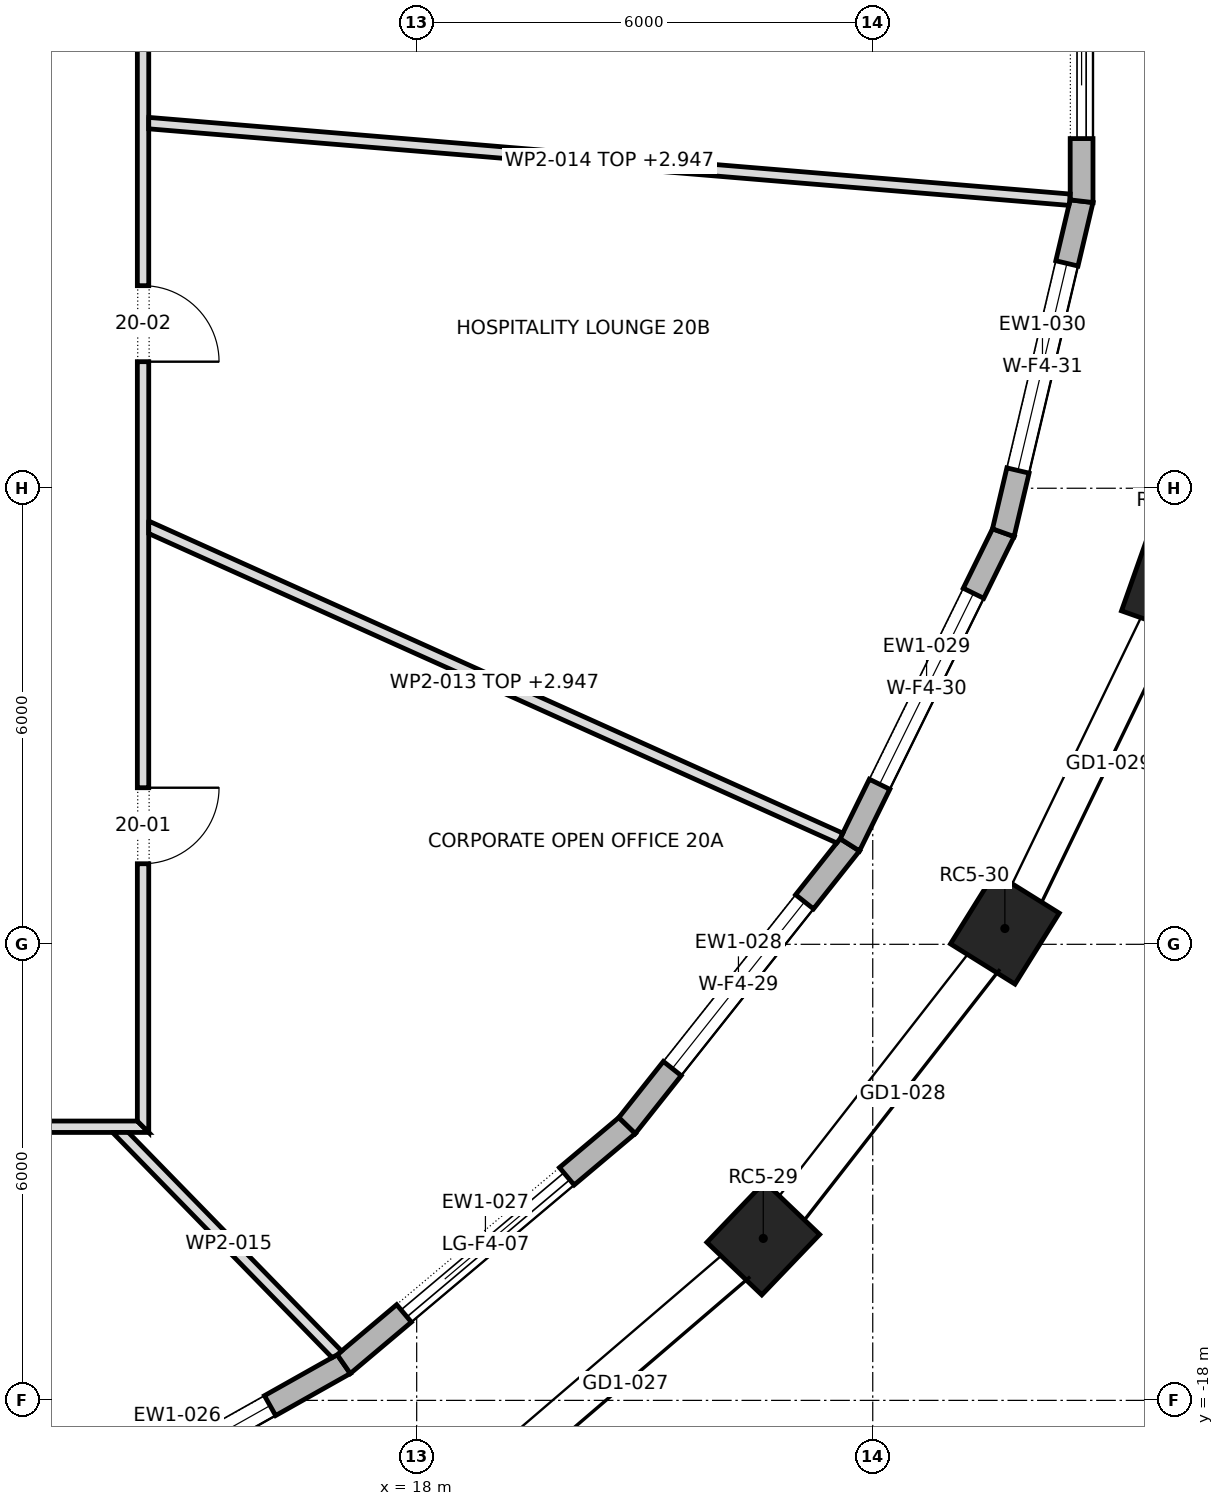
"""IFC4 building model, lengths in metres.
Left out: names, types, materials, properties, quantities, classifications, styles, units other than length and angle.
Written with IfcOpenShell. Run it as: python <this file> out.ifc"""

import sys

from ifc_helpers import new_model, si_unit, direction, frame, frame_2d, origin, origin_2d, place, context, subcontext, project, spatial, polyline, rectangle, outline, extrude, element, fill, save


model = new_model("IFC4")
c1 = context("Model", 3, precision=1e-05, world=origin(), true_north=direction((0.0, 1.0)))
c2 = subcontext(c1, "Body", "Model", "MODEL_VIEW")
j1 = project(units=[si_unit("LENGTHUNIT", "METRE"), si_unit("PLANEANGLEUNIT", "RADIAN")], contexts=[c1])
p1 = place(None, origin())
s1 = spatial("IfcSite", under=j1, at=p1, CompositionType="ELEMENT")
p2 = place(p1, origin())
s2 = spatial("IfcBuilding", under=s1, at=p2, CompositionType="ELEMENT")
p3 = place(p2, frame((0.0, 0.0, 288.3)))
s3 = spatial("IfcBuildingStorey", under=s2, at=p3, CompositionType="ELEMENT", Elevation=288.3)
for number, where, z_axis, x_axis in (
    (1, (22.56, -15.869, 0.0), (0.0, 0.0, 1.0), (0.692, 0.722, 0.0)),
    (2, (25.738, -11.792, 0.0), (0.0, 0.0, 1.0), (0.529, 0.849, 0.0)),
    (3, (27.927, -7.261, 0.0), (0.0, 0.0, 1.0), (0.334, 0.943, 0.0)),
):
    element("IfcColumn", number, at=place(p3, frame(where, z_axis=z_axis, x_axis=x_axis)), inside=s3, PredefinedType="COLUMN", context=c2, shape_type="SweptSolid", body=[
        extrude(rectangle(XDim=1.1, YDim=1.0, at=origin_2d()), origin(), (0.0, 0.0, 1.0), 4.0),
    ])
p4 = place(p3, frame((12.661, -19.988, 0.0), z_axis=(0.0, 0.0, 1.0), x_axis=(0.871488606878, 0.490415750239, 0.0)))
e4 = element("IfcWall", 4, at=p4, inside=s3, PredefinedType="STANDARD", context=c2, shape_type="SweptSolid", body=[
    extrude(outline(polyline([(-0.013, -0.15), (5.04, -0.15), (5.012, 0.15), (0.013, 0.15), (-0.013, -0.15)])), origin(), (0.0, 0.0, 1.0), 3.7),
])
p5 = place(p4, frame((1.113, 0.0, 0.6)))
e5 = element("IfcOpeningElement", 5, at=p5, cuts=e4, PredefinedType="OPENING", context=c2, shape_type="SweptSolid", body=[
    extrude(rectangle(XDim=2.8, YDim=2.65, at=frame_2d((1.4, 1.325))), frame((0.0, 0.162, 0.0), z_axis=(0.0, -1.0, 0.0), x_axis=(1.0, 0.0, 0.0)), (0.0, 0.0, 1.0), 0.324),
])
p6 = place(p3, frame((17.041, -17.523, 0.0), z_axis=(0.0, 0.0, 1.0), x_axis=(0.764876116592, 0.644177402792, 0.0)))
e6 = element("IfcWall", 6, at=p6, inside=s3, PredefinedType="STANDARD", context=c2, shape_type="SweptSolid", body=[
    extrude(outline(polyline([(-0.014, -0.15), (4.888, -0.15), (4.858, 0.15), (0.014, 0.15), (-0.014, -0.15)])), origin(), (0.0, 0.0, 1.0), 3.7),
])
p7 = place(p6, frame((1.036, 0.0, 0.0)))
e7 = element("IfcOpeningElement", 7, at=p7, cuts=e6, PredefinedType="OPENING", context=c2, shape_type="SweptSolid", body=[
    extrude(rectangle(XDim=2.8, YDim=3.25, at=frame_2d((1.4, 1.625))), frame((0.0, 0.162, 0.0), z_axis=(0.0, -1.0, 0.0), x_axis=(1.0, 0.0, 0.0)), (0.0, 0.0, 1.0), 0.324),
])
p8 = place(p3, frame((20.768, -14.384, 0.0), z_axis=(0.0, 0.0, 1.0), x_axis=(0.621544881236, 0.783378555112, 0.0)))
e8 = element("IfcWall", 8, at=p8, inside=s3, PredefinedType="STANDARD", context=c2, shape_type="SweptSolid", body=[
    extrude(outline(polyline([(-0.015, -0.15), (4.73, -0.15), (4.698, 0.15), (0.015, 0.15), (-0.015, -0.15)])), origin(), (0.0, 0.0, 1.0), 3.7),
])
p9 = place(p8, frame((0.957, 0.0, 0.6)))
e9 = element("IfcOpeningElement", 9, at=p9, cuts=e8, PredefinedType="OPENING", context=c2, shape_type="SweptSolid", body=[
    extrude(rectangle(XDim=2.8, YDim=2.65, at=frame_2d((1.4, 1.325))), frame((0.0, 0.162, 0.0), z_axis=(0.0, -1.0, 0.0), x_axis=(1.0, 0.0, 0.0)), (0.0, 0.0, 1.0), 0.324),
])
p10 = place(p3, frame((23.698, -10.691, 0.0), z_axis=(0.0, 0.0, 1.0), x_axis=(0.441335149795, 0.897342345794, 0.0)))
e10 = element("IfcWall", 10, at=p10, inside=s3, PredefinedType="STANDARD", context=c2, shape_type="SweptSolid", body=[
    extrude(outline(polyline([(-0.016, -0.15), (4.593, -0.15), (4.559, 0.15), (0.016, 0.15), (-0.016, -0.15)])), origin(), (0.0, 0.0, 1.0), 3.7),
])
p11 = place(p10, frame((0.888, 0.0, 0.6)))
e11 = element("IfcOpeningElement", 11, at=p11, cuts=e10, PredefinedType="OPENING", context=c2, shape_type="SweptSolid", body=[
    extrude(rectangle(XDim=2.8, YDim=2.65, at=frame_2d((1.4, 1.325))), frame((0.0, 0.162, 0.0), z_axis=(0.0, -1.0, 0.0), x_axis=(1.0, 0.0, 0.0)), (0.0, 0.0, 1.0), 0.324),
])
p12 = place(p3, frame((25.718, -6.585, 0.0), z_axis=(0.0, 0.0, 1.0), x_axis=(0.229862207503, 0.973223183839, 0.0)))
e12 = element("IfcWall", 12, at=p12, inside=s3, PredefinedType="STANDARD", context=c2, shape_type="SweptSolid", body=[
    extrude(outline(polyline([(-0.017, -0.15), (4.499, -0.15), (4.463, 0.15), (0.017, 0.15), (-0.017, -0.15)])), origin(), (0.0, 0.0, 1.0), 3.7),
])
p13 = place(p12, frame((0.841, 0.0, 0.6)))
e13 = element("IfcOpeningElement", 13, at=p13, cuts=e12, PredefinedType="OPENING", context=c2, shape_type="SweptSolid", body=[
    extrude(rectangle(XDim=2.8, YDim=2.65, at=frame_2d((1.4, 1.325))), frame((0.0, 0.162, 0.0), z_axis=(0.0, -1.0, 0.0), x_axis=(1.0, 0.0, 0.0)), (0.0, 0.0, 1.0), 0.324),
])
p14 = place(p3, frame((26.748, -2.224, 0.0), z_axis=(0.0, 0.0, 1.0), x_axis=(0.0, 1.0, 0.0)))
e14 = element("IfcWall", 14, at=p14, inside=s3, PredefinedType="STANDARD", context=c2, shape_type="SweptSolid", body=[
    extrude(outline(polyline([(-0.018, -0.15), (4.465, -0.15), (4.43, 0.15), (0.018, 0.15), (-0.018, -0.15)])), origin(), (0.0, 0.0, 1.0), 3.7),
])
p15 = place(p14, frame((0.824, 0.0, 0.0)))
e15 = element("IfcOpeningElement", 15, at=p15, cuts=e14, PredefinedType="OPENING", context=c2, shape_type="SweptSolid", body=[
    extrude(rectangle(XDim=2.8, YDim=3.25, at=frame_2d((1.4, 1.625))), frame((0.0, 0.162, 0.0), z_axis=(0.0, -1.0, 0.0), x_axis=(1.0, 0.0, 0.0)), (0.0, 0.0, 1.0), 0.324),
])
p16 = place(p3, frame((-14.475, -14.4, 0.0), z_axis=(0.0, 0.0, 1.0), x_axis=(1.0, 0.0, 0.0)))
e16 = element("IfcWall", 16, at=p16, inside=s3, PredefinedType="PARTITIONING", context=c2, shape_type="SweptSolid", body=[
    extrude(outline(polyline([(0.0, -0.075), (1.93, -0.075), (3.86, -0.075), (5.79, -0.075), (7.72, -0.075), (9.65, -0.075), (11.58, -0.075), (13.51, -0.075), (15.44, -0.075), (17.37, -0.075), (19.3, -0.075), (21.23, -0.075), (23.16, -0.075), (25.09, -0.075), (27.02, -0.075), (28.95, -0.075), (28.8, 0.075), (26.89, 0.075), (24.98, 0.075), (23.07, 0.075), (21.16, 0.075), (19.25, 0.075), (17.34, 0.075), (15.43, 0.075), (13.52, 0.075), (11.61, 0.075), (9.7, 0.075), (7.79, 0.075), (5.88, 0.075), (3.97, 0.075), (2.06, 0.075), (0.15, 0.075), (0.0, -0.075)])), origin(), (0.0, 0.0, 1.0), 3.7),
])
p17 = place(p16, frame((5.535, 0.0, 0.0)))
e17 = element("IfcOpeningElement", 17, at=p17, cuts=e16, PredefinedType="OPENING", context=c2, shape_type="SweptSolid", body=[
    extrude(rectangle(XDim=1.8, YDim=2.1, at=frame_2d((0.9, 1.05))), frame((0.0, 0.087, 0.0), z_axis=(0.0, -1.0, 0.0), x_axis=(1.0, 0.0, 0.0)), (0.0, 0.0, 1.0), 0.174),
])
p18 = place(p16, frame((15.73, 0.0, 0.0)))
e18 = element("IfcOpeningElement", 18, at=p18, cuts=e16, PredefinedType="OPENING", context=c2, shape_type="SweptSolid", body=[
    extrude(rectangle(XDim=1.0, YDim=2.1, at=frame_2d((0.5, 1.05))), frame((0.0, 0.087, 0.0), z_axis=(0.0, -1.0, 0.0), x_axis=(1.0, 0.0, 0.0)), (0.0, 0.0, 1.0), 0.174),
])
p19 = place(p16, frame((23.585, 0.0, 0.0)))
e19 = element("IfcOpeningElement", 19, at=p19, cuts=e16, PredefinedType="OPENING", context=c2, shape_type="SweptSolid", body=[
    extrude(rectangle(XDim=1.0, YDim=2.1, at=frame_2d((0.5, 1.05))), frame((0.0, 0.087, 0.0), z_axis=(0.0, -1.0, 0.0), x_axis=(1.0, 0.0, 0.0)), (0.0, 0.0, 1.0), 0.174),
])
p20 = place(p3, frame((14.4, -14.475, 0.0), z_axis=(0.0, 0.0, 1.0), x_axis=(0.0, 1.0, 0.0)))
e20 = element("IfcWall", 20, at=p20, inside=s3, PredefinedType="PARTITIONING", context=c2, shape_type="SweptSolid", body=[
    extrude(outline(polyline([(0.0, -0.075), (1.93, -0.075), (3.86, -0.075), (5.79, -0.075), (7.72, -0.075), (9.65, -0.075), (11.58, -0.075), (13.51, -0.075), (15.44, -0.075), (17.37, -0.075), (19.3, -0.075), (21.23, -0.075), (23.16, -0.075), (25.09, -0.075), (27.02, -0.075), (28.95, -0.075), (28.8, 0.075), (26.89, 0.075), (24.98, 0.075), (23.07, 0.075), (21.16, 0.075), (19.25, 0.075), (17.34, 0.075), (15.43, 0.075), (13.52, 0.075), (11.61, 0.075), (9.7, 0.075), (7.79, 0.075), (5.88, 0.075), (3.97, 0.075), (2.06, 0.075), (0.15, 0.075), (0.0, -0.075)])), origin(), (0.0, 0.0, 1.0), 3.7),
])
p21 = place(p20, frame((3.535, 0.0, 0.0)))
e21 = element("IfcOpeningElement", 21, at=p21, cuts=e20, PredefinedType="OPENING", context=c2, shape_type="SweptSolid", body=[
    extrude(rectangle(XDim=1.0, YDim=2.1, at=frame_2d((0.5, 1.05))), frame((0.0, 0.087, 0.0), z_axis=(0.0, -1.0, 0.0), x_axis=(1.0, 0.0, 0.0)), (0.0, 0.0, 1.0), 0.174),
])
p22 = place(p20, frame((10.14, 0.0, 0.0)))
e22 = element("IfcOpeningElement", 22, at=p22, cuts=e20, PredefinedType="OPENING", context=c2, shape_type="SweptSolid", body=[
    extrude(rectangle(XDim=1.0, YDim=2.1, at=frame_2d((0.5, 1.05))), frame((0.0, 0.087, 0.0), z_axis=(0.0, -1.0, 0.0), x_axis=(1.0, 0.0, 0.0)), (0.0, 0.0, 1.0), 0.174),
])
p23 = place(p20, frame((20.18, 0.0, 0.0)))
e23 = element("IfcOpeningElement", 23, at=p23, cuts=e20, PredefinedType="OPENING", context=c2, shape_type="SweptSolid", body=[
    extrude(rectangle(XDim=1.8, YDim=2.1, at=frame_2d((0.9, 1.05))), frame((0.0, 0.087, 0.0), z_axis=(0.0, -1.0, 0.0), x_axis=(1.0, 0.0, 0.0)), (0.0, 0.0, 1.0), 0.174),
])
p24 = place(p3, frame((14.445, -6.5, 0.0), z_axis=(0.0, 0.0, 1.0), x_axis=(0.912008635086, -0.410171000351, 0.0)))
e24 = element("IfcWall", 24, at=p24, inside=s3, PredefinedType="PARTITIONING", context=c2, shape_type="SweptSolid", body=[
    extrude(outline(polyline([(0.067, -0.075), (2.052, -0.075), (4.037, -0.075), (6.021, -0.075), (8.006, -0.075), (9.991, -0.075), (10.009, -0.005), (10.011, 0.071), (10.011, 0.075), (8.343, 0.075), (6.674, 0.075), (5.006, 0.075), (3.337, 0.075), (1.668, 0.075), (0.0, 0.075), (0.0, 0.074), (0.067, -0.075)])), origin(), (0.0, 0.0, 1.0), 2.947),
])
p25 = place(p3, frame((14.469, -1.196, 0.0), z_axis=(0.0, 0.0, 1.0), x_axis=(0.996556684965, -0.08291425481, 0.0)))
e25 = element("IfcWall", 25, at=p25, inside=s3, PredefinedType="PARTITIONING", context=c2, shape_type="SweptSolid", body=[
    extrude(outline(polyline([(0.012, -0.075), (1.747, -0.075), (3.483, -0.075), (5.218, -0.075), (6.953, -0.075), (8.689, -0.075), (10.424, -0.075), (12.159, -0.075), (12.164, -0.045), (12.164, 0.075), (10.426, 0.075), (8.688, 0.075), (6.951, 0.075), (5.213, 0.075), (3.475, 0.075), (1.738, 0.075), (0.0, 0.075), (0.0, 0.07), (0.012, -0.075)])), origin(), (0.0, 0.0, 1.0), 2.947),
])
p26 = place(p3, frame((16.958, -17.403, 0.0), z_axis=(0.0, 0.0, 1.0), x_axis=(-0.698164782934, 0.715937103293, 0.0)))
e26 = element("IfcWall", 26, at=p26, inside=s3, PredefinedType="PARTITIONING", context=c2, shape_type="SweptSolid", body=[
    extrude(outline(polyline([(0.0, -0.075), (1.339, -0.075), (2.678, -0.075), (4.016, -0.075), (4.069, -0.021), (4.069, -0.021), (4.162, 0.075), (4.162, 0.075), (2.783, 0.075), (1.404, 0.075), (0.025, 0.075), (0.005, -0.0), (0.0, -0.067), (0.0, -0.075)])), origin(), (0.0, 0.0, 1.0), 3.7),
])
p27 = place(p5, origin())
e27 = element("IfcWindow", 27, at=p27, inside=s3, PartitioningType="DOUBLE_PANEL_VERTICAL", PredefinedType="WINDOW", context=c2, shape_type="SweptSolid", body=[
    extrude(rectangle(XDim=2.8, YDim=2.65, at=frame_2d((1.4, 1.325))), frame((0.0, 0.03, 0.0), z_axis=(0.0, -1.0, 0.0), x_axis=(1.0, 0.0, 0.0)), (0.0, 0.0, 1.0), 0.06),
])
fill(e5, e27)
p28 = place(p7, origin())
e28 = element("IfcDoor", 28, at=p28, inside=s3, OperationType="DOUBLE_DOOR_SLIDING", PredefinedType="DOOR", context=c2, shape_type="SweptSolid", body=[
    extrude(rectangle(XDim=2.8, YDim=3.25, at=frame_2d((1.4, 1.625))), frame((0.0, 0.025, 0.0), z_axis=(0.0, -1.0, 0.0), x_axis=(1.0, 0.0, 0.0)), (0.0, 0.0, 1.0), 0.05),
])
fill(e7, e28)
p29 = place(p9, origin())
e29 = element("IfcWindow", 29, at=p29, inside=s3, PartitioningType="DOUBLE_PANEL_VERTICAL", PredefinedType="WINDOW", context=c2, shape_type="SweptSolid", body=[
    extrude(rectangle(XDim=2.8, YDim=2.65, at=frame_2d((1.4, 1.325))), frame((0.0, 0.03, 0.0), z_axis=(0.0, -1.0, 0.0), x_axis=(1.0, 0.0, 0.0)), (0.0, 0.0, 1.0), 0.06),
])
fill(e9, e29)
p30 = place(p11, origin())
e30 = element("IfcWindow", 30, at=p30, inside=s3, PartitioningType="DOUBLE_PANEL_VERTICAL", PredefinedType="WINDOW", context=c2, shape_type="SweptSolid", body=[
    extrude(rectangle(XDim=2.8, YDim=2.65, at=frame_2d((1.4, 1.325))), frame((0.0, 0.03, 0.0), z_axis=(0.0, -1.0, 0.0), x_axis=(1.0, 0.0, 0.0)), (0.0, 0.0, 1.0), 0.06),
])
fill(e11, e30)
p31 = place(p13, origin())
e31 = element("IfcWindow", 31, at=p31, inside=s3, PartitioningType="DOUBLE_PANEL_VERTICAL", PredefinedType="WINDOW", context=c2, shape_type="SweptSolid", body=[
    extrude(rectangle(XDim=2.8, YDim=2.65, at=frame_2d((1.4, 1.325))), frame((0.0, 0.03, 0.0), z_axis=(0.0, -1.0, 0.0), x_axis=(1.0, 0.0, 0.0)), (0.0, 0.0, 1.0), 0.06),
])
fill(e13, e31)
p32 = place(p15, origin())
e32 = element("IfcDoor", 32, at=p32, inside=s3, OperationType="DOUBLE_DOOR_SLIDING", PredefinedType="DOOR", context=c2, shape_type="SweptSolid", body=[
    extrude(rectangle(XDim=2.8, YDim=3.25, at=frame_2d((1.4, 1.625))), frame((0.0, 0.025, 0.0), z_axis=(0.0, -1.0, 0.0), x_axis=(1.0, 0.0, 0.0)), (0.0, 0.0, 1.0), 0.05),
])
fill(e15, e32)
p33 = place(p21, frame((1.0, 0.0, 0.0), z_axis=(0.0, 0.0, 1.0), x_axis=(-1.0, 0.0, 0.0)))
e33 = element("IfcDoor", 33, at=p33, inside=s3, OperationType="SINGLE_SWING_RIGHT", PredefinedType="DOOR", context=c2, shape_type="SweptSolid", body=[
    extrude(rectangle(XDim=1.0, YDim=2.1, at=frame_2d((0.5, 1.05))), frame((0.0, 0.025, 0.0), z_axis=(0.0, -1.0, 0.0), x_axis=(1.0, 0.0, 0.0)), (0.0, 0.0, 1.0), 0.05),
])
fill(e21, e33)
p34 = place(p22, frame((1.0, 0.0, 0.0), z_axis=(0.0, 0.0, 1.0), x_axis=(-1.0, 0.0, 0.0)))
e34 = element("IfcDoor", 34, at=p34, inside=s3, OperationType="SINGLE_SWING_LEFT", PredefinedType="DOOR", context=c2, shape_type="SweptSolid", body=[
    extrude(rectangle(XDim=1.0, YDim=2.1, at=frame_2d((0.5, 1.05))), frame((0.0, 0.025, 0.0), z_axis=(0.0, -1.0, 0.0), x_axis=(1.0, 0.0, 0.0)), (0.0, 0.0, 1.0), 0.05),
])
fill(e22, e34)
save(model, sys.argv[1])
